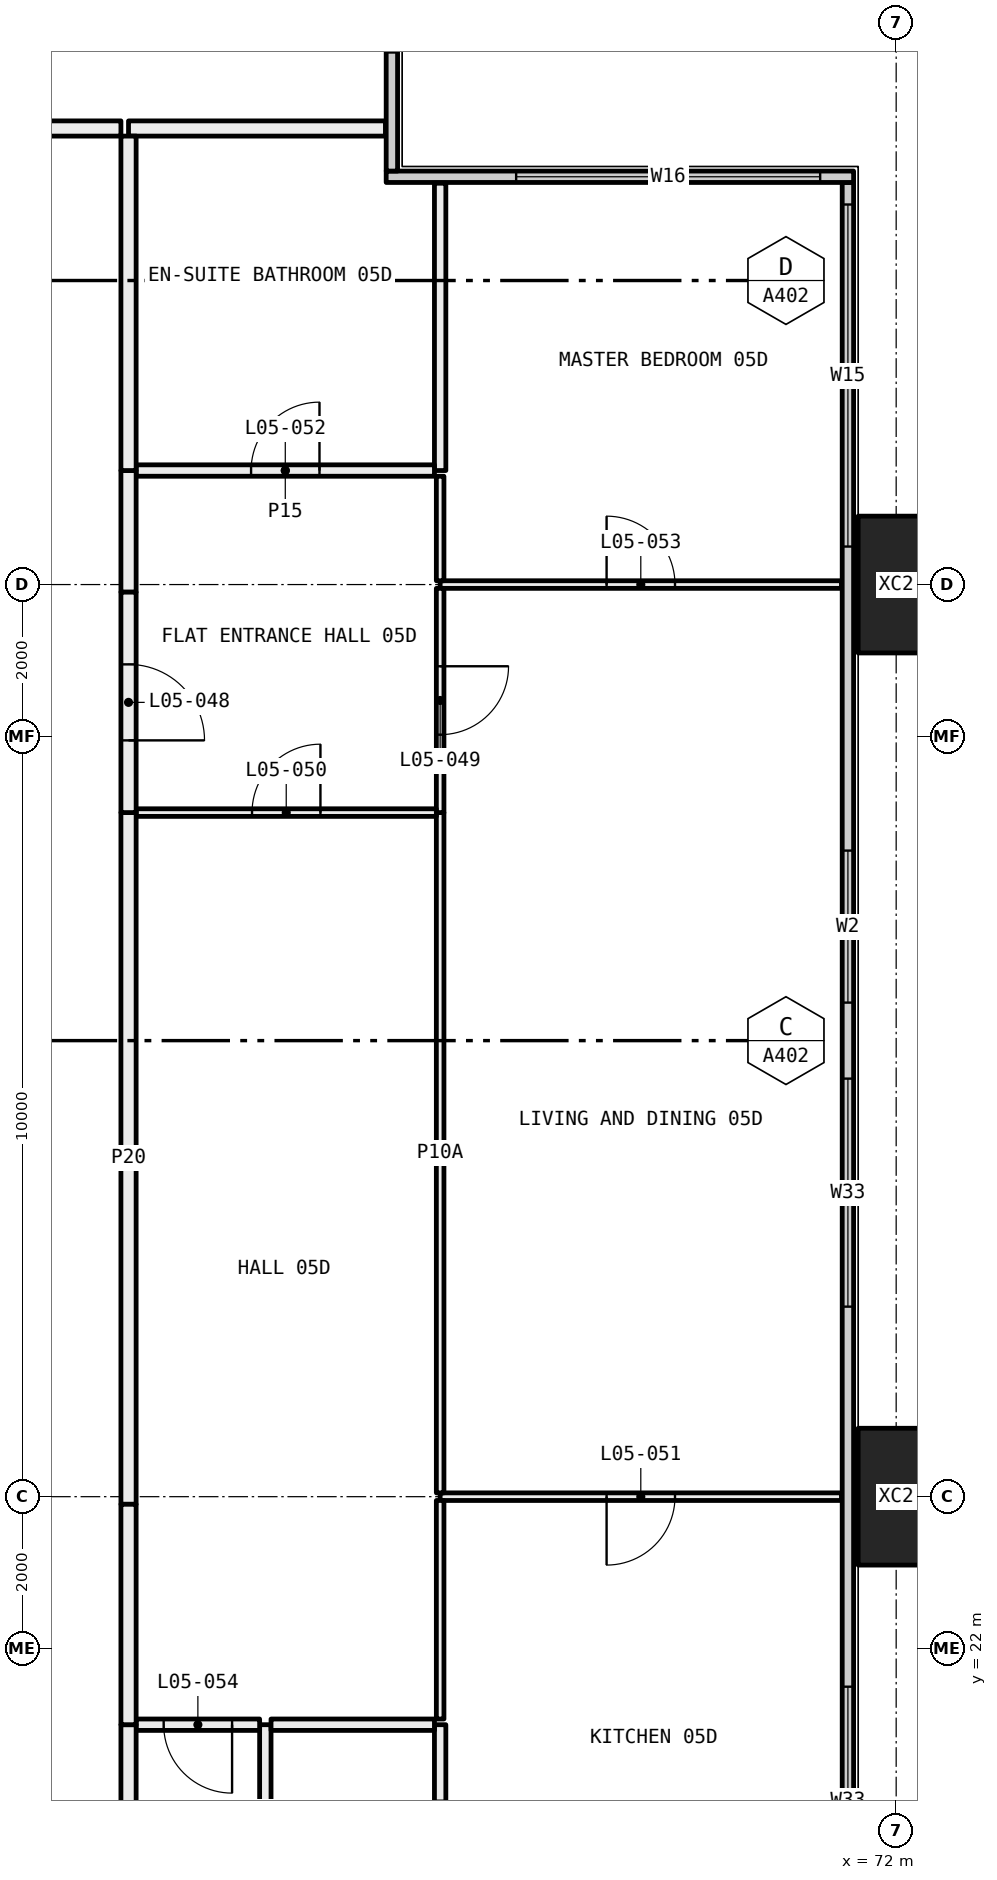
"""IFC4 building model, lengths in metres.
Left out: names, types, materials, properties, quantities, classifications, styles, units other than length and angle.
Written with IfcOpenShell. Run it as: python <this file> out.ifc"""

import sys

from ifc_helpers import new_model, si_unit, direction, frame, frame_2d, origin, origin_2d, place, context, subcontext, project, spatial, rectangle, hollow_rectangle, extrude, element, fill, save


model = new_model("IFC4")
c1 = context("Model", 3, precision=1e-05, world=origin(), true_north=direction((0.0, 1.0)))
c2 = subcontext(c1, "Body", "Model", "MODEL_VIEW")
j1 = project(units=[si_unit("LENGTHUNIT", "METRE"), si_unit("PLANEANGLEUNIT", "RADIAN")], contexts=[c1])
p1 = place(None, origin())
s1 = spatial("IfcSite", under=j1, at=p1, CompositionType="ELEMENT")
p2 = place(p1, origin())
s2 = spatial("IfcBuilding", under=s1, at=p2, CompositionType="ELEMENT")
p3 = place(p2, frame((0.0, 0.0, 30.0)))
s3 = spatial("IfcBuildingStorey", under=s2, at=p3, CompositionType="ELEMENT", Elevation=30.0)
for number, where, z_axis, x_axis in (
    (1, (72.0, 24.0, -0.4), (0.0, 0.0, 1.0), (0.0, 1.0, 0.0)),
    (2, (72.0, 36.0, -0.4), (0.0, 0.0, 1.0), (0.0, 1.0, 0.0)),
):
    element("IfcColumn", number, at=place(p3, frame(where, z_axis=z_axis, x_axis=x_axis)), inside=s3, PredefinedType="COLUMN", context=c2, shape_type="SweptSolid", body=[
        extrude(hollow_rectangle(XDim=1.8, YDim=1.0, WallThickness=0.07, at=origin_2d()), origin(), (0.0, 0.0, 1.0), 3.45),
    ])
p4 = place(p3, frame((71.365, 6.71, 0.0), z_axis=(0.0, 0.0, 1.0), x_axis=(0.0, 1.0, 0.0)))
e3 = element("IfcWall", 3, at=p4, inside=s3, PredefinedType="ELEMENTEDWALL", context=c2, shape_type="SweptSolid", body=[
    extrude(rectangle(XDim=34.58, YDim=0.15, at=frame_2d((17.29, 0.0))), origin(), (0.0, 0.0, 1.0), 3.05),
])
p5 = place(p4, frame((0.29, 0.0, 0.45)))
e4 = element("IfcOpeningElement", 4, at=p5, cuts=e3, PredefinedType="OPENING", context=c2, shape_type="SweptSolid", body=[
    extrude(rectangle(XDim=4.5, YDim=2.55, at=frame_2d((2.25, 1.275))), frame((0.0, 0.085, 0.0), z_axis=(0.0, -1.0, 0.0), x_axis=(1.0, 0.0, 0.0)), (0.0, 0.0, 1.0), 0.17),
])
p6 = place(p4, frame((7.79, 0.0, 0.45)))
e5 = element("IfcOpeningElement", 5, at=p6, cuts=e3, PredefinedType="OPENING", context=c2, shape_type="SweptSolid", body=[
    extrude(rectangle(XDim=3.0, YDim=2.55, at=frame_2d((1.5, 1.275))), frame((0.0, 0.085, 0.0), z_axis=(0.0, -1.0, 0.0), x_axis=(1.0, 0.0, 0.0)), (0.0, 0.0, 1.0), 0.17),
])
p7 = place(p4, frame((11.79, 0.0, 0.45)))
e6 = element("IfcOpeningElement", 6, at=p7, cuts=e3, PredefinedType="OPENING", context=c2, shape_type="SweptSolid", body=[
    extrude(rectangle(XDim=3.0, YDim=2.55, at=frame_2d((1.5, 1.275))), frame((0.0, 0.085, 0.0), z_axis=(0.0, -1.0, 0.0), x_axis=(1.0, 0.0, 0.0)), (0.0, 0.0, 1.0), 0.17),
])
p8 = place(p4, frame((19.79, 0.0, 0.45)))
e7 = element("IfcOpeningElement", 7, at=p8, cuts=e3, PredefinedType="OPENING", context=c2, shape_type="SweptSolid", body=[
    extrude(rectangle(XDim=3.0, YDim=2.55, at=frame_2d((1.5, 1.275))), frame((0.0, 0.085, 0.0), z_axis=(0.0, -1.0, 0.0), x_axis=(1.0, 0.0, 0.0)), (0.0, 0.0, 1.0), 0.17),
])
p9 = place(p4, frame((23.79, 0.0, 0.45)))
e8 = element("IfcOpeningElement", 8, at=p9, cuts=e3, PredefinedType="OPENING", context=c2, shape_type="SweptSolid", body=[
    extrude(rectangle(XDim=2.0, YDim=2.55, at=frame_2d((1.0, 1.275))), frame((0.0, 0.085, 0.0), z_axis=(0.0, -1.0, 0.0), x_axis=(1.0, 0.0, 0.0)), (0.0, 0.0, 1.0), 0.17),
])
p10 = place(p4, frame((29.79, 0.0, 0.45)))
e9 = element("IfcOpeningElement", 9, at=p10, cuts=e3, PredefinedType="OPENING", context=c2, shape_type="SweptSolid", body=[
    extrude(rectangle(XDim=4.5, YDim=2.55, at=frame_2d((2.25, 1.275))), frame((0.0, 0.085, 0.0), z_axis=(0.0, -1.0, 0.0), x_axis=(1.0, 0.0, 0.0)), (0.0, 0.0, 1.0), 0.17),
])
p11 = place(p3, frame((65.29, 41.365, 0.0), z_axis=(0.0, 0.0, 1.0), x_axis=(1.0, 0.0, 0.0)))
e10 = element("IfcWall", 10, at=p11, inside=s3, PredefinedType="ELEMENTEDWALL", context=c2, shape_type="SweptSolid", body=[
    extrude(rectangle(XDim=6.15, YDim=0.15, at=frame_2d((3.075, 0.0))), origin(), (0.0, 0.0, 1.0), 3.05),
])
p12 = place(p11, frame((1.71, 0.0, 0.45)))
e11 = element("IfcOpeningElement", 11, at=p12, cuts=e10, PredefinedType="OPENING", context=c2, shape_type="SweptSolid", body=[
    extrude(rectangle(XDim=4.0, YDim=2.55, at=frame_2d((2.0, 1.275))), frame((0.0, 0.085, 0.0), z_axis=(0.0, -1.0, 0.0), x_axis=(1.0, 0.0, 0.0)), (0.0, 0.0, 1.0), 0.17),
])
p13 = place(p3, frame((65.365, 41.44, 0.0), z_axis=(0.0, 0.0, 1.0), x_axis=(0.0, 1.0, 0.0)))
e12 = element("IfcWall", 12, at=p13, inside=s3, PredefinedType="ELEMENTEDWALL", context=c2, shape_type="SweptSolid", body=[
    extrude(rectangle(XDim=5.85, YDim=0.15, at=frame_2d((2.925, 0.0))), origin(), (0.0, 0.0, 1.0), 3.05),
])
p14 = place(p13, frame((1.56, 0.0, 0.45)))
e13 = element("IfcOpeningElement", 13, at=p14, cuts=e12, PredefinedType="OPENING", context=c2, shape_type="SweptSolid", body=[
    extrude(rectangle(XDim=4.0, YDim=2.55, at=frame_2d((2.0, 1.275))), frame((0.0, 0.085, 0.0), z_axis=(0.0, -1.0, 0.0), x_axis=(1.0, 0.0, 0.0)), (0.0, 0.0, 1.0), 0.17),
])
p15 = place(p3, frame((71.28, 24.0, 0.0), z_axis=(0.0, 0.0, 1.0), x_axis=(-1.0, 0.0, 0.0)))
e14 = element("IfcWall", 14, at=p15, inside=s3, PredefinedType="PARTITIONING", context=c2, shape_type="SweptSolid", body=[
    extrude(rectangle(XDim=5.28, YDim=0.1, at=frame_2d((2.64, 0.0))), origin(), (0.0, 0.0, 1.0), 2.45),
])
p16 = place(p15, frame((2.19, 0.0, 0.0)))
e15 = element("IfcOpeningElement", 15, at=p16, cuts=e14, PredefinedType="OPENING", context=c2, shape_type="SweptSolid", body=[
    extrude(rectangle(XDim=0.9, YDim=2.1, at=frame_2d((0.45, 1.05))), frame((0.0, 0.06, 0.0), z_axis=(0.0, -1.0, 0.0), x_axis=(1.0, 0.0, 0.0)), (0.0, 0.0, 1.0), 0.12),
])
p17 = place(p3, frame((66.0, 21.0, 0.0), z_axis=(0.0, 0.0, 1.0), x_axis=(0.0, -1.0, 0.0)))
e16 = element("IfcWall", 16, at=p17, inside=s3, PredefinedType="PARTITIONING", context=c2, shape_type="SweptSolid", body=[
    extrude(rectangle(XDim=2.9, YDim=0.15, at=frame_2d((1.45, 0.0))), origin(), (0.0, 0.0, 1.0), 3.05),
])
p18 = place(p17, frame((1.0, 0.0, 0.0)))
e17 = element("IfcOpeningElement", 17, at=p18, cuts=e16, PredefinedType="OPENING", context=c2, shape_type="SweptSolid", body=[
    extrude(rectangle(XDim=0.9, YDim=2.1, at=frame_2d((0.45, 1.05))), frame((0.0, 0.085, 0.0), z_axis=(0.0, -1.0, 0.0), x_axis=(1.0, 0.0, 0.0)), (0.0, 0.0, 1.0), 0.17),
])
p19 = place(p3, frame((66.0, 23.95, 0.0), z_axis=(0.0, 0.0, 1.0), x_axis=(0.0, -1.0, 0.0)))
e18 = element("IfcWall", 18, at=p19, inside=s3, PredefinedType="PARTITIONING", context=c2, shape_type="SweptSolid", body=[
    extrude(rectangle(XDim=2.875, YDim=0.1, at=frame_2d((1.438, 0.0))), origin(), (0.0, 0.0, 1.0), 2.45),
])
p20 = place(p3, frame((71.28, 36.0, 0.0), z_axis=(0.0, 0.0, 1.0), x_axis=(-1.0, 0.0, 0.0)))
e19 = element("IfcWall", 19, at=p20, inside=s3, PredefinedType="PARTITIONING", context=c2, shape_type="SweptSolid", body=[
    extrude(rectangle(XDim=5.28, YDim=0.1, at=frame_2d((2.64, 0.0))), origin(), (0.0, 0.0, 1.0), 2.45),
])
p21 = place(p20, frame((2.19, 0.0, 0.0)))
e20 = element("IfcOpeningElement", 20, at=p21, cuts=e19, PredefinedType="OPENING", context=c2, shape_type="SweptSolid", body=[
    extrude(rectangle(XDim=0.9, YDim=2.1, at=frame_2d((0.45, 1.05))), frame((0.0, 0.06, 0.0), z_axis=(0.0, -1.0, 0.0), x_axis=(1.0, 0.0, 0.0)), (0.0, 0.0, 1.0), 0.12),
])
p22 = place(p3, frame((66.0, 33.0, 0.0), z_axis=(0.0, 0.0, 1.0), x_axis=(0.0, -1.0, 0.0)))
e21 = element("IfcWall", 21, at=p22, inside=s3, PredefinedType="PARTITIONING", context=c2, shape_type="SweptSolid", body=[
    extrude(rectangle(XDim=8.95, YDim=0.1, at=frame_2d((4.475, 0.0))), origin(), (0.0, 0.0, 1.0), 2.45),
])
p23 = place(p3, frame((66.0, 35.95, 0.0), z_axis=(0.0, 0.0, 1.0), x_axis=(0.0, -1.0, 0.0)))
e22 = element("IfcWall", 22, at=p23, inside=s3, PredefinedType="PARTITIONING", context=c2, shape_type="SweptSolid", body=[
    extrude(rectangle(XDim=2.95, YDim=0.1, at=frame_2d((1.475, 0.0))), origin(), (0.0, 0.0, 1.0), 2.45),
])
p24 = place(p23, frame((1.025, 0.0, 0.0)))
e23 = element("IfcOpeningElement", 23, at=p24, cuts=e22, PredefinedType="OPENING", context=c2, shape_type="SweptSolid", body=[
    extrude(rectangle(XDim=0.9, YDim=2.1, at=frame_2d((0.45, 1.05))), frame((0.0, 0.06, 0.0), z_axis=(0.0, -1.0, 0.0), x_axis=(1.0, 0.0, 0.0)), (0.0, 0.0, 1.0), 0.12),
])
p25 = place(p3, frame((66.0, 37.425, 0.0), z_axis=(0.0, 0.0, 1.0), x_axis=(0.0, -1.0, 0.0)))
e24 = element("IfcWall", 24, at=p25, inside=s3, PredefinedType="PARTITIONING", context=c2, shape_type="SweptSolid", body=[
    extrude(rectangle(XDim=1.375, YDim=0.1, at=frame_2d((0.688, 0.0))), origin(), (0.0, 0.0, 1.0), 2.45),
])
p26 = place(p3, frame((66.0, 41.28, 0.0), z_axis=(0.0, 0.0, 1.0), x_axis=(0.0, -1.0, 0.0)))
e25 = element("IfcWall", 25, at=p26, inside=s3, PredefinedType="PARTITIONING", context=c2, shape_type="SweptSolid", body=[
    extrude(rectangle(XDim=3.78, YDim=0.15, at=frame_2d((1.89, 0.0))), origin(), (0.0, 0.0, 1.0), 3.05),
])
p27 = place(p3, frame((63.7, 18.1, 0.0), z_axis=(0.0, 0.0, 1.0), x_axis=(0.0, 1.0, 0.0)))
e26 = element("IfcWall", 26, at=p27, inside=s3, PredefinedType="PARTITIONING", context=c2, shape_type="SweptSolid", body=[
    extrude(rectangle(XDim=2.9, YDim=0.15, at=frame_2d((1.45, 0.0))), origin(), (0.0, 0.0, 1.0), 3.05),
])
p28 = place(p3, frame((63.625, 21.0, 0.0), z_axis=(0.0, 0.0, 1.0), x_axis=(-1.0, 0.0, 0.0)))
e27 = element("IfcWall", 27, at=p28, inside=s3, PredefinedType="PARTITIONING", context=c2, shape_type="SweptSolid", body=[
    extrude(rectangle(XDim=1.625, YDim=0.15, at=frame_2d((0.812, 0.0))), origin(), (0.0, 0.0, 1.0), 3.05),
])
p29 = place(p28, frame((0.363, 0.0, 0.0)))
e28 = element("IfcOpeningElement", 28, at=p29, cuts=e27, PredefinedType="OPENING", context=c2, shape_type="SweptSolid", body=[
    extrude(rectangle(XDim=0.9, YDim=2.1, at=frame_2d((0.45, 1.05))), frame((0.0, 0.085, 0.0), z_axis=(0.0, -1.0, 0.0), x_axis=(1.0, 0.0, 0.0)), (0.0, 0.0, 1.0), 0.17),
])
p30 = place(p3, frame((61.9, 21.0, 0.0), z_axis=(0.0, 0.0, 1.0), x_axis=(0.0, -1.0, 0.0)))
e29 = element("IfcWall", 29, at=p30, inside=s3, PredefinedType="PARTITIONING", context=c2, shape_type="SweptSolid", body=[
    extrude(rectangle(XDim=2.9, YDim=0.2, at=frame_2d((1.45, 0.0))), origin(), (0.0, 0.0, 1.0), 3.05),
])
p31 = place(p3, frame((65.925, 21.0, 0.0), z_axis=(0.0, 0.0, 1.0), x_axis=(-1.0, 0.0, 0.0)))
e30 = element("IfcWall", 30, at=p31, inside=s3, PredefinedType="PARTITIONING", context=c2, shape_type="SweptSolid", body=[
    extrude(rectangle(XDim=2.15, YDim=0.15, at=frame_2d((1.075, 0.0))), origin(), (0.0, 0.0, 1.0), 3.05),
])
p32 = place(p3, frame((65.95, 33.0, 0.0), z_axis=(0.0, 0.0, 1.0), x_axis=(-1.0, 0.0, 0.0)))
e31 = element("IfcWall", 31, at=p32, inside=s3, PredefinedType="PARTITIONING", context=c2, shape_type="SweptSolid", body=[
    extrude(rectangle(XDim=3.95, YDim=0.1, at=frame_2d((1.975, 0.0))), origin(), (0.0, 0.0, 1.0), 3.05),
])
p33 = place(p32, frame((1.525, 0.0, 0.0)))
e32 = element("IfcOpeningElement", 32, at=p33, cuts=e31, PredefinedType="OPENING", context=c2, shape_type="SweptSolid", body=[
    extrude(rectangle(XDim=0.9, YDim=2.1, at=frame_2d((0.45, 1.05))), frame((0.0, 0.06, 0.0), z_axis=(0.0, -1.0, 0.0), x_axis=(1.0, 0.0, 0.0)), (0.0, 0.0, 1.0), 0.12),
])
p34 = place(p3, frame((61.9, 33.0, 0.0), z_axis=(0.0, 0.0, 1.0), x_axis=(0.0, -1.0, 0.0)))
e33 = element("IfcWall", 33, at=p34, inside=s3, PredefinedType="PARTITIONING", context=c2, shape_type="SweptSolid", body=[
    extrude(rectangle(XDim=9.1, YDim=0.2, at=frame_2d((4.55, 0.0))), origin(), (0.0, 0.0, 1.0), 2.45),
])
p35 = place(p3, frame((61.9, 23.9, 0.0), z_axis=(0.0, 0.0, 1.0), x_axis=(0.0, -1.0, 0.0)))
e34 = element("IfcWall", 34, at=p35, inside=s3, PredefinedType="PARTITIONING", context=c2, shape_type="SweptSolid", body=[
    extrude(rectangle(XDim=2.9, YDim=0.2, at=frame_2d((1.45, 0.0))), origin(), (0.0, 0.0, 1.0), 3.05),
])
p36 = place(p3, frame((65.925, 37.5, 0.0), z_axis=(0.0, 0.0, 1.0), x_axis=(-1.0, 0.0, 0.0)))
e35 = element("IfcWall", 35, at=p36, inside=s3, PredefinedType="PARTITIONING", context=c2, shape_type="SweptSolid", body=[
    extrude(rectangle(XDim=3.925, YDim=0.15, at=frame_2d((1.962, 0.0))), origin(), (0.0, 0.0, 1.0), 3.05),
])
p37 = place(p36, frame((1.512, 0.0, 0.0)))
e36 = element("IfcOpeningElement", 36, at=p37, cuts=e35, PredefinedType="OPENING", context=c2, shape_type="SweptSolid", body=[
    extrude(rectangle(XDim=0.9, YDim=2.1, at=frame_2d((0.45, 1.05))), frame((0.0, 0.085, 0.0), z_axis=(0.0, -1.0, 0.0), x_axis=(1.0, 0.0, 0.0)), (0.0, 0.0, 1.0), 0.17),
])
p38 = place(p3, frame((61.9, 37.5, 0.0), z_axis=(0.0, 0.0, 1.0), x_axis=(0.0, -1.0, 0.0)))
e37 = element("IfcWall", 37, at=p38, inside=s3, PredefinedType="PARTITIONING", context=c2, shape_type="SweptSolid", body=[
    extrude(rectangle(XDim=1.6, YDim=0.2, at=frame_2d((0.8, 0.0))), origin(), (0.0, 0.0, 1.0), 2.45),
])
p39 = place(p3, frame((61.9, 35.9, 0.0), z_axis=(0.0, 0.0, 1.0), x_axis=(0.0, -1.0, 0.0)))
e38 = element("IfcWall", 38, at=p39, inside=s3, PredefinedType="PARTITIONING", context=c2, shape_type="SweptSolid", body=[
    extrude(rectangle(XDim=2.9, YDim=0.2, at=frame_2d((1.45, 0.0))), origin(), (0.0, 0.0, 1.0), 3.05),
])
p40 = place(p39, frame((0.95, 0.0, 0.0)))
e39 = element("IfcOpeningElement", 39, at=p40, cuts=e38, PredefinedType="OPENING", context=c2, shape_type="SweptSolid", body=[
    extrude(rectangle(XDim=1.0, YDim=2.1, at=frame_2d((0.5, 1.05))), frame((0.0, 0.11, 0.0), z_axis=(0.0, -1.0, 0.0), x_axis=(1.0, 0.0, 0.0)), (0.0, 0.0, 1.0), 0.22),
])
p41 = place(p3, frame((65.28, 42.0, 0.0), z_axis=(0.0, 0.0, 1.0), x_axis=(-1.0, 0.0, 0.0)))
e40 = element("IfcWall", 40, at=p41, inside=s3, PredefinedType="PARTITIONING", context=c2, shape_type="SweptSolid", body=[
    extrude(rectangle(XDim=3.38, YDim=0.2, at=frame_2d((1.69, 0.0))), origin(), (0.0, 0.0, 1.0), 3.05),
])
p42 = place(p3, frame((61.9, 41.9, 0.0), z_axis=(0.0, 0.0, 1.0), x_axis=(0.0, -1.0, 0.0)))
e41 = element("IfcWall", 41, at=p42, inside=s3, PredefinedType="PARTITIONING", context=c2, shape_type="SweptSolid", body=[
    extrude(rectangle(XDim=4.4, YDim=0.2, at=frame_2d((2.2, 0.0))), origin(), (0.0, 0.0, 1.0), 3.05),
])
p43 = place(p3, frame((60.0, 42.0, 0.0), z_axis=(0.0, 0.0, 1.0), x_axis=(1.0, 0.0, 0.0)))
e42 = element("IfcWall", 42, at=p43, inside=s3, PredefinedType="PARTITIONING", context=c2, shape_type="SweptSolid", body=[
    extrude(rectangle(XDim=1.8, YDim=0.2, at=frame_2d((0.9, 0.0))), origin(), (0.0, 0.0, 1.0), 3.05),
])
p44 = place(p7, origin())
e43 = element("IfcWindow", 43, at=p44, inside=s3, PartitioningType="SINGLE_PANEL", PredefinedType="WINDOW", context=c2, shape_type="SweptSolid", body=[
    extrude(rectangle(XDim=3.0, YDim=2.55, at=frame_2d((1.5, 1.275))), frame((0.0, 0.03, 0.0), z_axis=(0.0, -1.0, 0.0), x_axis=(1.0, 0.0, 0.0)), (0.0, 0.0, 1.0), 0.06),
])
fill(e6, e43)
p45 = place(p8, origin())
e44 = element("IfcWindow", 44, at=p45, inside=s3, PartitioningType="SINGLE_PANEL", PredefinedType="WINDOW", context=c2, shape_type="SweptSolid", body=[
    extrude(rectangle(XDim=3.0, YDim=2.55, at=frame_2d((1.5, 1.275))), frame((0.0, 0.03, 0.0), z_axis=(0.0, -1.0, 0.0), x_axis=(1.0, 0.0, 0.0)), (0.0, 0.0, 1.0), 0.06),
])
fill(e7, e44)
p46 = place(p9, origin())
e45 = element("IfcWindow", 45, at=p46, inside=s3, PartitioningType="SINGLE_PANEL", PredefinedType="WINDOW", context=c2, shape_type="SweptSolid", body=[
    extrude(rectangle(XDim=2.0, YDim=2.55, at=frame_2d((1.0, 1.275))), frame((0.0, 0.03, 0.0), z_axis=(0.0, -1.0, 0.0), x_axis=(1.0, 0.0, 0.0)), (0.0, 0.0, 1.0), 0.06),
])
fill(e8, e45)
p47 = place(p10, origin())
e46 = element("IfcWindow", 46, at=p47, inside=s3, PartitioningType="SINGLE_PANEL", PredefinedType="WINDOW", context=c2, shape_type="SweptSolid", body=[
    extrude(rectangle(XDim=4.5, YDim=2.55, at=frame_2d((2.25, 1.275))), frame((0.0, 0.03, 0.0), z_axis=(0.0, -1.0, 0.0), x_axis=(1.0, 0.0, 0.0)), (0.0, 0.0, 1.0), 0.06),
])
fill(e9, e46)
p48 = place(p12, origin())
e47 = element("IfcWindow", 47, at=p48, inside=s3, PartitioningType="SINGLE_PANEL", PredefinedType="WINDOW", context=c2, shape_type="SweptSolid", body=[
    extrude(rectangle(XDim=4.0, YDim=2.55, at=frame_2d((2.0, 1.275))), frame((0.0, 0.03, 0.0), z_axis=(0.0, -1.0, 0.0), x_axis=(1.0, 0.0, 0.0)), (0.0, 0.0, 1.0), 0.06),
])
fill(e11, e47)
p49 = place(p40, origin())
e48 = element("IfcDoor", 48, at=p49, inside=s3, OperationType="SINGLE_SWING_LEFT", PredefinedType="DOOR", context=c2, shape_type="SweptSolid", body=[
    extrude(rectangle(XDim=1.0, YDim=2.1, at=frame_2d((0.5, 1.05))), frame((0.0, 0.025, 0.0), z_axis=(0.0, -1.0, 0.0), x_axis=(1.0, 0.0, 0.0)), (0.0, 0.0, 1.0), 0.05),
])
fill(e39, e48)
p50 = place(p24, origin())
e49 = element("IfcDoor", 49, at=p50, inside=s3, OperationType="SINGLE_SWING_RIGHT", PredefinedType="DOOR", context=c2, shape_type="SweptSolid", body=[
    extrude(rectangle(XDim=0.9, YDim=2.1, at=frame_2d((0.45, 1.05))), frame((0.0, 0.025, 0.0), z_axis=(0.0, -1.0, 0.0), x_axis=(1.0, 0.0, 0.0)), (0.0, 0.0, 1.0), 0.05),
])
fill(e23, e49)
p51 = place(p33, frame((0.9, 0.0, 0.0), x_axis=(-1.0, 0.0, 0.0)))
e50 = element("IfcDoor", 50, at=p51, inside=s3, OperationType="SINGLE_SWING_LEFT", PredefinedType="DOOR", context=c2, shape_type="SweptSolid", body=[
    extrude(rectangle(XDim=0.9, YDim=2.1, at=frame_2d((0.45, 1.05))), frame((0.0, 0.025, 0.0), z_axis=(0.0, -1.0, 0.0), x_axis=(1.0, 0.0, 0.0)), (0.0, 0.0, 1.0), 0.05),
])
fill(e32, e50)
p52 = place(p16, origin())
e51 = element("IfcDoor", 51, at=p52, inside=s3, OperationType="SINGLE_SWING_LEFT", PredefinedType="DOOR", context=c2, shape_type="SweptSolid", body=[
    extrude(rectangle(XDim=0.9, YDim=2.1, at=frame_2d((0.45, 1.05))), frame((0.0, 0.025, 0.0), z_axis=(0.0, -1.0, 0.0), x_axis=(1.0, 0.0, 0.0)), (0.0, 0.0, 1.0), 0.05),
])
fill(e15, e51)
p53 = place(p37, frame((0.9, 0.0, 0.0), x_axis=(-1.0, 0.0, 0.0)))
e52 = element("IfcDoor", 52, at=p53, inside=s3, OperationType="SINGLE_SWING_LEFT", PredefinedType="DOOR", context=c2, shape_type="SweptSolid", body=[
    extrude(rectangle(XDim=0.9, YDim=2.1, at=frame_2d((0.45, 1.05))), frame((0.0, 0.025, 0.0), z_axis=(0.0, -1.0, 0.0), x_axis=(1.0, 0.0, 0.0)), (0.0, 0.0, 1.0), 0.05),
])
fill(e36, e52)
p54 = place(p21, frame((0.9, 0.0, 0.0), x_axis=(-1.0, 0.0, 0.0)))
e53 = element("IfcDoor", 53, at=p54, inside=s3, OperationType="SINGLE_SWING_RIGHT", PredefinedType="DOOR", context=c2, shape_type="SweptSolid", body=[
    extrude(rectangle(XDim=0.9, YDim=2.1, at=frame_2d((0.45, 1.05))), frame((0.0, 0.025, 0.0), z_axis=(0.0, -1.0, 0.0), x_axis=(1.0, 0.0, 0.0)), (0.0, 0.0, 1.0), 0.05),
])
fill(e20, e53)
p55 = place(p29, origin())
e54 = element("IfcDoor", 54, at=p55, inside=s3, OperationType="SINGLE_SWING_RIGHT", PredefinedType="DOOR", context=c2, shape_type="SweptSolid", body=[
    extrude(rectangle(XDim=0.9, YDim=2.1, at=frame_2d((0.45, 1.05))), frame((0.0, 0.025, 0.0), z_axis=(0.0, -1.0, 0.0), x_axis=(1.0, 0.0, 0.0)), (0.0, 0.0, 1.0), 0.05),
])
fill(e28, e54)
save(model, sys.argv[1])
